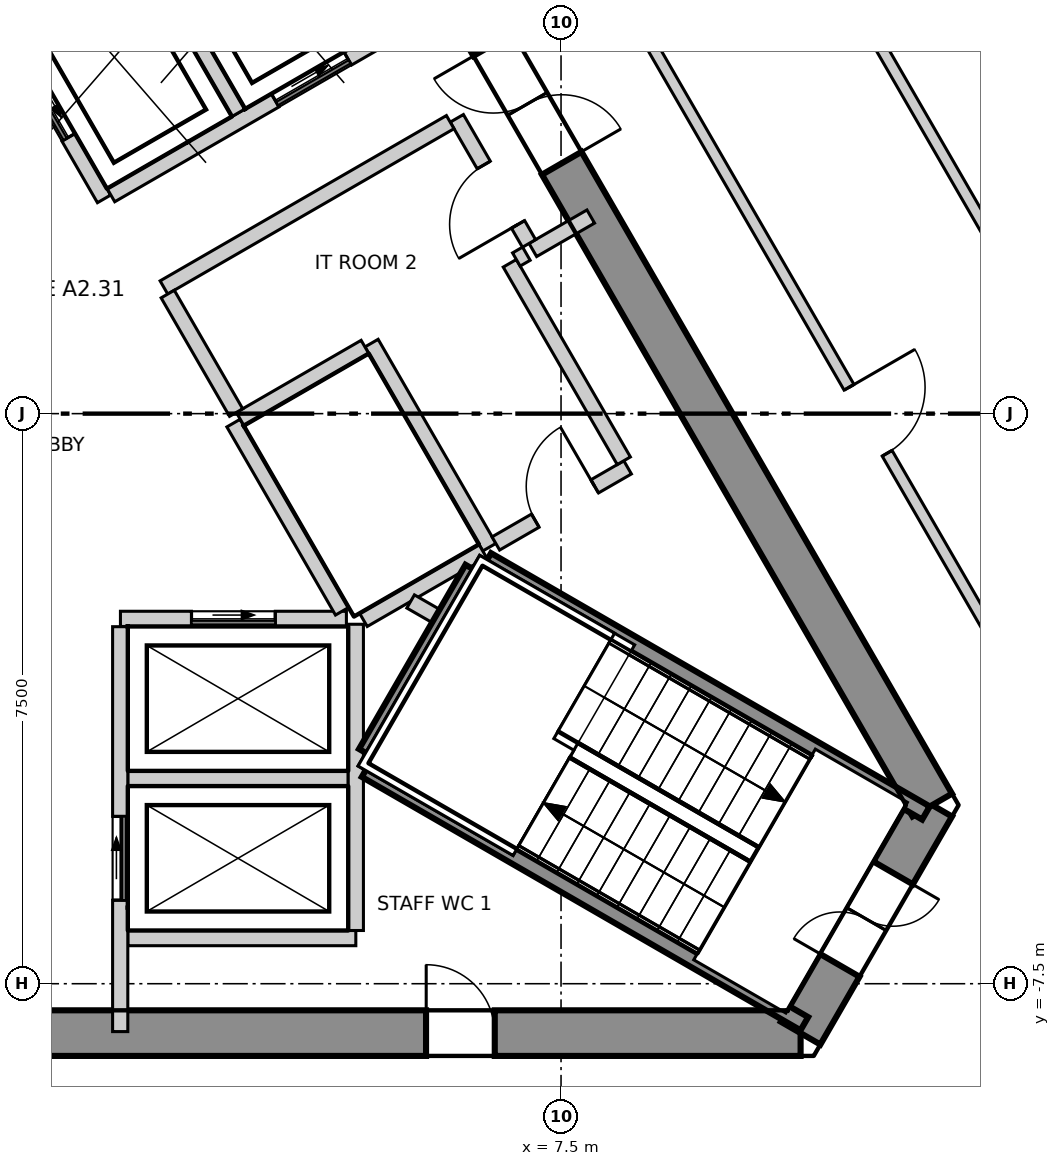
"""IFC4 building model, lengths in metres.
Left out: names, types, materials, properties, quantities, classifications, styles, units other than length and angle.
Written with IfcOpenShell. Run it as: python <this file> out.ifc"""

import sys

from ifc_helpers import new_model, si_unit, direction, frame, frame_2d, origin, place, context, subcontext, project, spatial, polyline, rectangle, outline, extrude, element, fill, save


model = new_model("IFC4")
c1 = context("Model", 3, precision=1e-05, world=origin(), true_north=direction((0.0, 1.0)))
c2 = subcontext(c1, "Body", "Model", "MODEL_VIEW")
j1 = project(units=[si_unit("LENGTHUNIT", "METRE"), si_unit("PLANEANGLEUNIT", "RADIAN")], contexts=[c1])
p1 = place(None, origin())
s1 = spatial("IfcSite", under=j1, at=p1, CompositionType="ELEMENT")
p2 = place(p1, origin())
s2 = spatial("IfcBuilding", under=s1, at=p2, CompositionType="ELEMENT")
p3 = place(p2, frame((0.0, 0.0, 261.8)))
s3 = spatial("IfcBuildingStorey", under=s2, at=p3, CompositionType="ELEMENT", Elevation=261.8)
p4 = place(p3, frame((-10.652, -8.15, -0.3), z_axis=(0.0, 0.0, 1.0), x_axis=(1.0, 0.0, 0.0)))
e1 = element("IfcWall", 1, at=p4, inside=s3, PredefinedType="SHEAR", context=c2, shape_type="SweptSolid", body=[
    extrude(outline(polyline([(-0.173, -0.3), (1.795, -0.3), (3.763, -0.3), (5.731, -0.3), (7.7, -0.3), (9.668, -0.3), (11.636, -0.3), (13.604, -0.3), (15.573, -0.3), (17.541, -0.3), (19.509, -0.3), (21.477, -0.3), (21.131, 0.3), (19.226, 0.3), (17.321, 0.3), (15.415, 0.3), (13.51, 0.3), (11.605, 0.3), (9.699, 0.3), (7.794, 0.3), (5.889, 0.3), (3.984, 0.3), (2.078, 0.3), (0.173, 0.3), (-0.173, -0.3)])), origin(), (0.0, 0.0, 1.0), 6.5),
])
p5 = place(p4, frame((4.026, 0.0, 0.3)))
e2 = element("IfcOpeningElement", 2, at=p5, cuts=e1, PredefinedType="OPENING", context=c2, shape_type="SweptSolid", body=[
    extrude(rectangle(XDim=0.9, YDim=2.1, at=frame_2d((0.45, 1.05))), frame((0.0, 0.31, 0.0), z_axis=(0.0, -1.0, 0.0), x_axis=(1.0, 0.0, 0.0)), (0.0, 0.0, 1.0), 0.62),
])
p6 = place(p4, frame((16.378, 0.0, 0.3)))
e3 = element("IfcOpeningElement", 3, at=p6, cuts=e1, PredefinedType="OPENING", context=c2, shape_type="SweptSolid", body=[
    extrude(rectangle(XDim=0.9, YDim=2.1, at=frame_2d((0.45, 1.05))), frame((0.0, 0.31, 0.0), z_axis=(0.0, -1.0, 0.0), x_axis=(1.0, 0.0, 0.0)), (0.0, 0.0, 1.0), 0.62),
])
p7 = place(p3, frame((10.652, -8.15, -0.3), z_axis=(0.0, 0.0, 1.0), x_axis=(0.49997462182, 0.866040055388, 0.0)))
e4 = element("IfcWall", 4, at=p7, inside=s3, PredefinedType="SHEAR", context=c2, shape_type="SweptSolid", body=[
    extrude(outline(polyline([(-0.173, -0.3), (1.732, -0.301), (3.638, -0.301), (3.291, 0.3), (1.732, 0.3), (0.173, 0.3), (-0.173, -0.3)])), origin(), (0.0, 0.0, 1.0), 6.5),
])
p8 = place(p7, frame((1.032, 0.0, 0.3)))
e5 = element("IfcOpeningElement", 5, at=p8, cuts=e4, PredefinedType="OPENING", context=c2, shape_type="SweptSolid", body=[
    extrude(rectangle(XDim=1.4, YDim=2.1, at=frame_2d((0.7, 1.05))), frame((0.0, 0.31, 0.0), z_axis=(0.0, -1.0, 0.0), x_axis=(1.0, 0.0, 0.0)), (0.0, 0.0, 1.0), 0.621),
])
p9 = place(p3, frame((12.384, -5.15, -0.3), z_axis=(0.0, 0.0, 1.0), x_axis=(-0.500000539815, 0.866025092122, 0.0)))
e6 = element("IfcWall", 6, at=p9, inside=s3, PredefinedType="SHEAR", context=c2, shape_type="SweptSolid", body=[
    extrude(outline(polyline([(-0.173, -0.301), (1.795, -0.301), (3.763, -0.301), (5.731, -0.301), (7.7, -0.301), (9.668, -0.301), (11.636, -0.301), (13.604, -0.3), (15.573, -0.3), (17.541, -0.3), (19.509, -0.3), (21.477, -0.3), (21.131, 0.3), (19.226, 0.3), (17.321, 0.3), (15.415, 0.3), (13.51, 0.3), (11.605, 0.3), (9.699, 0.3), (7.794, 0.3), (5.889, 0.3), (3.984, 0.3), (2.078, 0.3), (0.173, 0.3), (-0.173, -0.301)])), origin(), (0.0, 0.0, 1.0), 6.5),
])
p10 = place(p9, frame((9.752, 0.0, 0.3)))
e7 = element("IfcOpeningElement", 7, at=p10, cuts=e6, PredefinedType="OPENING", context=c2, shape_type="SweptSolid", body=[
    extrude(rectangle(XDim=1.8, YDim=2.1, at=frame_2d((0.9, 1.05))), frame((0.0, 0.31, 0.0), z_axis=(0.0, -1.0, 0.0), x_axis=(1.0, 0.0, 0.0)), (0.0, 0.0, 1.0), 0.621),
])
p11 = place(p9, frame((16.378, 0.0, 0.3)))
e8 = element("IfcOpeningElement", 8, at=p11, cuts=e6, PredefinedType="OPENING", context=c2, shape_type="SweptSolid", body=[
    extrude(rectangle(XDim=0.9, YDim=2.1, at=frame_2d((0.45, 1.05))), frame((0.0, 0.31, 0.0), z_axis=(0.0, -1.0, 0.0), x_axis=(1.0, 0.0, 0.0)), (0.0, 0.0, 1.0), 0.621),
])
p12 = place(p3, frame((2.689, 25.293, 0.0), z_axis=(0.0, 0.0, 1.0), x_axis=(0.500022309378, -0.866012523076, 0.0)))
e9 = element("IfcWall", 9, at=p12, inside=s3, PredefinedType="PARTITIONING", context=c2, shape_type="SweptSolid", body=[
    extrude(rectangle(XDim=41.206, YDim=0.15, at=frame_2d((20.603, 0.0))), origin(), (0.0, 0.0, 1.0), 6.2),
])
p13 = place(p3, frame((2.771, 15.1, 0.0), z_axis=(0.0, 0.0, 1.0), x_axis=(0.500017691629, -0.866015189277, 0.0)))
e10 = element("IfcWall", 10, at=p13, inside=s3, PredefinedType="PARTITIONING", context=c2, shape_type="SweptSolid", body=[
    extrude(rectangle(XDim=23.383, YDim=0.15, at=frame_2d((11.691, 0.0))), origin(), (0.0, 0.0, 1.0), 6.2),
])
p14 = place(p13, frame((17.037, 0.0, 0.0)))
e11 = element("IfcOpeningElement", 11, at=p14, cuts=e10, PredefinedType="OPENING", context=c2, shape_type="SweptSolid", body=[
    extrude(rectangle(XDim=1.0, YDim=2.1, at=frame_2d((0.5, 1.05))), frame((0.0, 0.085, 0.0), z_axis=(0.0, -1.0, 0.0), x_axis=(1.0, 0.0, 0.0)), (0.0, 0.0, 1.0), 0.17),
])
p15 = place(p13, frame((5.346, 0.0, 0.0)))
e12 = element("IfcOpeningElement", 12, at=p15, cuts=e10, PredefinedType="OPENING", context=c2, shape_type="SweptSolid", body=[
    extrude(rectangle(XDim=1.0, YDim=2.1, at=frame_2d((0.5, 1.05))), frame((0.0, 0.085, 0.0), z_axis=(0.0, -1.0, 0.0), x_axis=(1.0, 0.0, 0.0)), (0.0, 0.0, 1.0), 0.17),
])
p16 = place(p3, frame((2.166, 21.349, 0.0), z_axis=(0.0, 0.0, 1.0), x_axis=(0.499984980739, -0.866034074985, 0.0)))
e13 = element("IfcWall", 13, at=p16, inside=s3, PredefinedType="PARTITIONING", context=c2, shape_type="SweptSolid", body=[
    extrude(rectangle(XDim=34.991, YDim=0.15, at=frame_2d((17.495, 0.0))), origin(), (0.0, 0.0, 1.0), 6.2),
])
p17 = place(p3, frame((1.8, -6.9, 0.0), z_axis=(0.0, 0.0, 1.0), x_axis=(1.0, 0.0, 0.0)))
e14 = element("IfcWall", 14, at=p17, inside=s3, PredefinedType="SOLIDWALL", context=c2, shape_type="SweptSolid", body=[
    extrude(rectangle(XDim=3.0, YDim=0.2, at=frame_2d((1.5, 0.0))), origin(), (0.0, 0.0, 1.0), 6.2),
])
p18 = place(p3, frame((1.8, -4.8, 0.0), z_axis=(0.0, 0.0, 1.0), x_axis=(1.0, 0.0, 0.0)))
e15 = element("IfcWall", 15, at=p18, inside=s3, PredefinedType="SOLIDWALL", context=c2, shape_type="SweptSolid", body=[
    extrude(rectangle(XDim=2.9, YDim=0.2, at=frame_2d((1.45, 0.0))), origin(), (0.0, 0.0, 1.0), 6.2),
])
p19 = place(p3, frame((1.703, -2.7, 0.0), z_axis=(0.0, 0.0, 1.0), x_axis=(1.0, 0.0, 0.0)))
e16 = element("IfcWall", 16, at=p19, inside=s3, PredefinedType="SOLIDWALL", context=c2, shape_type="SweptSolid", body=[
    extrude(rectangle(XDim=2.973, YDim=0.2, at=frame_2d((1.487, 0.0))), origin(), (0.0, 0.0, 1.0), 6.2),
])
p20 = place(p19, frame((0.936, 0.0, 0.0)))
e17 = element("IfcOpeningElement", 17, at=p20, cuts=e16, PredefinedType="OPENING", context=c2, shape_type="SweptSolid", body=[
    extrude(rectangle(XDim=1.1, YDim=2.1, at=frame_2d((0.55, 1.05))), frame((0.0, 0.11, 0.0), z_axis=(0.0, -1.0, 0.0), x_axis=(1.0, 0.0, 0.0)), (0.0, 0.0, 1.0), 0.22),
])
p21 = place(p3, frame((0.0, 5.4, 0.0), z_axis=(0.0, 0.0, 1.0), x_axis=(0.500103862429, -0.865965430478, 0.0)))
e18 = element("IfcWall", 18, at=p21, inside=s3, PredefinedType="SOLIDWALL", context=c2, shape_type="SweptSolid", body=[
    extrude(rectangle(XDim=2.973, YDim=0.2, at=frame_2d((1.487, 0.0))), origin(), (0.0, 0.0, 1.0), 6.2),
])
p22 = place(p21, frame((0.937, 0.0, 0.0)))
e19 = element("IfcOpeningElement", 19, at=p22, cuts=e18, PredefinedType="OPENING", context=c2, shape_type="SweptSolid", body=[
    extrude(rectangle(XDim=1.1, YDim=2.1, at=frame_2d((0.55, 1.05))), frame((0.0, 0.11, 0.0), z_axis=(0.0, -1.0, 0.0), x_axis=(1.0, 0.0, 0.0)), (0.0, 0.0, 1.0), 0.22),
])
p23 = place(p3, frame((3.19, -0.125, 0.0), z_axis=(0.0, 0.0, 1.0), x_axis=(0.499988658015, -0.866031951983, 0.0)))
e20 = element("IfcWall", 20, at=p23, inside=s3, PredefinedType="SOLIDWALL", context=c2, shape_type="SweptSolid", body=[
    extrude(rectangle(XDim=2.858, YDim=0.2, at=frame_2d((1.429, 0.0))), origin(), (0.0, 0.0, 1.0), 6.2),
])
p24 = place(p3, frame((1.578, 2.874, 0.0), z_axis=(0.0, 0.0, 1.0), x_axis=(0.866045911672, 0.499964477614, 0.0)))
e21 = element("IfcWall", 21, at=p24, inside=s3, PredefinedType="SOLIDWALL", context=c2, shape_type="SweptSolid", body=[
    extrude(rectangle(XDim=5.327, YDim=0.2, at=frame_2d((2.663, 0.0))), origin(), (0.0, 0.0, 1.0), 6.2),
])
p25 = place(p24, frame((2.496, 0.0, 0.0)))
e22 = element("IfcOpeningElement", 22, at=p25, cuts=e21, PredefinedType="OPENING", context=c2, shape_type="SweptSolid", body=[
    extrude(rectangle(XDim=1.1, YDim=2.1, at=frame_2d((0.55, 1.05))), frame((0.0, 0.11, 0.0), z_axis=(0.0, -1.0, 0.0), x_axis=(1.0, 0.0, 0.0)), (0.0, 0.0, 1.0), 0.22),
])
p26 = place(p3, frame((1.7, -8.13, 0.0), z_axis=(0.0, 0.0, 1.0), x_axis=(0.0, 1.0, 0.0)))
e23 = element("IfcWall", 23, at=p26, inside=s3, PredefinedType="SOLIDWALL", context=c2, shape_type="SweptSolid", body=[
    extrude(rectangle(XDim=5.327, YDim=0.2, at=frame_2d((2.664, 0.0))), origin(), (0.0, 0.0, 1.0), 6.2),
])
p27 = place(p26, frame((1.73, 0.0, 0.0)))
e24 = element("IfcOpeningElement", 24, at=p27, cuts=e23, PredefinedType="OPENING", context=c2, shape_type="SweptSolid", body=[
    extrude(rectangle(XDim=1.1, YDim=2.1, at=frame_2d((0.55, 1.05))), frame((0.0, 0.11, 0.0), z_axis=(0.0, -1.0, 0.0), x_axis=(1.0, 0.0, 0.0)), (0.0, 0.0, 1.0), 0.22),
])
p28 = place(p3, frame((4.8, -6.8, 0.0), z_axis=(0.0, 0.0, 1.0), x_axis=(0.0, 1.0, 0.0)))
e25 = element("IfcWall", 25, at=p28, inside=s3, PredefinedType="SOLIDWALL", context=c2, shape_type="SweptSolid", body=[
    extrude(rectangle(XDim=4.029, YDim=0.2, at=frame_2d((2.015, 0.0))), origin(), (0.0, 0.0, 1.0), 6.2),
])
p29 = place(p3, frame((1.807, 6.47, 0.0), z_axis=(0.0, 0.0, 1.0), x_axis=(0.50012328804, -0.865954211699, 0.0)))
e26 = element("IfcWall", 26, at=p29, inside=s3, PredefinedType="SOLIDWALL", context=c2, shape_type="SweptSolid", body=[
    extrude(rectangle(XDim=2.9, YDim=0.2, at=frame_2d((1.45, 0.0))), origin(), (0.0, 0.0, 1.0), 6.2),
])
p30 = place(p3, frame((5.007, 0.928, 0.0), z_axis=(0.0, 0.0, 1.0), x_axis=(0.499899694197, -0.866083307622, 0.0)))
e27 = element("IfcWall", 27, at=p30, inside=s3, PredefinedType="SOLIDWALL", context=c2, shape_type="SweptSolid", body=[
    extrude(rectangle(XDim=3.1, YDim=0.2, at=frame_2d((1.55, 0.0))), origin(), (0.0, 0.0, 1.0), 6.2),
])
p31 = place(p3, frame((3.278, -0.071, 0.0), z_axis=(0.0, 0.0, 1.0), x_axis=(0.865784509405, 0.500417009377, 0.0)))
e28 = element("IfcWall", 28, at=p31, inside=s3, PredefinedType="SOLIDWALL", context=c2, shape_type="SweptSolid", body=[
    extrude(rectangle(XDim=1.896, YDim=0.2, at=frame_2d((0.948, 0.0))), origin(), (0.0, 0.0, 1.0), 6.2),
])
p32 = place(p3, frame((7.129, 2.153, 0.0), z_axis=(0.0, 0.0, 1.0), x_axis=(0.866083962871, 0.499898558967, 0.0)))
e29 = element("IfcWall", 29, at=p32, inside=s3, PredefinedType="SOLIDWALL", context=c2, shape_type="SweptSolid", body=[
    extrude(rectangle(XDim=0.88, YDim=0.2, at=frame_2d((0.44, 0.0))), origin(), (0.0, 0.0, 1.0), 6.2),
])
p33 = place(p3, frame((6.129, 3.885, 0.0), z_axis=(0.0, 0.0, 1.0), x_axis=(0.499952260202, -0.866052964615, 0.0)))
e30 = element("IfcWall", 30, at=p33, inside=s3, PredefinedType="SOLIDWALL", context=c2, shape_type="SweptSolid", body=[
    extrude(rectangle(XDim=1.901, YDim=0.2, at=frame_2d((0.95, 0.0))), origin(), (0.0, 0.0, 1.0), 6.2),
])
p34 = place(p33, frame((0.71, 0.0, 0.0)))
e31 = element("IfcOpeningElement", 31, at=p34, cuts=e30, PredefinedType="OPENING", context=c2, shape_type="SweptSolid", body=[
    extrude(rectangle(XDim=0.9, YDim=2.1, at=frame_2d((0.45, 1.05))), frame((0.0, 0.11, 0.0), z_axis=(0.0, -1.0, 0.0), x_axis=(1.0, 0.0, 0.0)), (0.0, 0.0, 1.0), 0.22),
])
p35 = place(p3, frame((2.275, 1.66, 0.0), z_axis=(0.0, 0.0, 1.0), x_axis=(0.866013608182, 0.500020430026, 0.0)))
e32 = element("IfcWall", 32, at=p35, inside=s3, PredefinedType="SOLIDWALL", context=c2, shape_type="SweptSolid", body=[
    extrude(rectangle(XDim=4.35, YDim=0.2, at=frame_2d((2.175, 0.0))), origin(), (0.0, 0.0, 1.0), 6.2),
])
p36 = place(p3, frame((2.325, 1.573, 0.0), z_axis=(0.0, 0.0, 1.0), x_axis=(0.500004188491, -0.866022985545, 0.0)))
e33 = element("IfcWall", 33, at=p36, inside=s3, PredefinedType="SOLIDWALL", context=c2, shape_type="SweptSolid", body=[
    extrude(rectangle(XDim=1.8, YDim=0.2, at=frame_2d((0.9, 0.0))), origin(), (0.0, 0.0, 1.0), 6.2),
])
p37 = place(p3, frame((4.9, -2.714, 0.0), z_axis=(0.0, 0.0, 1.0), x_axis=(0.865846928409, 0.500309001083, 0.0)))
e34 = element("IfcWall", 34, at=p37, inside=s3, PredefinedType="SOLIDWALL", context=c2, shape_type="SweptSolid", body=[
    extrude(rectangle(XDim=1.813, YDim=0.2, at=frame_2d((0.907, 0.0))), origin(), (0.0, 0.0, 1.0), 6.2),
])
p38 = place(p3, frame((5.521, -2.471, 0.0), z_axis=(0.0, 0.0, 1.0), x_axis=(0.866630806644, -0.498949942355, 0.0)))
e35 = element("IfcWall", 35, at=p38, inside=s3, PredefinedType="SOLIDWALL", context=c2, shape_type="SweptSolid", body=[
    extrude(rectangle(XDim=0.383, YDim=0.2, at=frame_2d((0.191, 0.0))), origin(), (0.0, 0.0, 1.0), 6.2),
])
p39 = place(p3, frame((6.642, -1.708, 0.0), z_axis=(0.0, 0.0, 1.0), x_axis=(0.866043441391, 0.499968756647, 0.0)))
e36 = element("IfcWall", 36, at=p39, inside=s3, PredefinedType="SOLIDWALL", context=c2, shape_type="SweptSolid", body=[
    extrude(rectangle(XDim=2.002, YDim=0.2, at=frame_2d((1.001, 0.0))), origin(), (0.0, 0.0, 1.0), 6.2),
])
p40 = place(p39, frame((0.601, 0.0, 0.0)))
e37 = element("IfcOpeningElement", 37, at=p40, cuts=e36, PredefinedType="OPENING", context=c2, shape_type="SweptSolid", body=[
    extrude(rectangle(XDim=0.9, YDim=2.1, at=frame_2d((0.45, 1.05))), frame((0.0, 0.11, 0.0), z_axis=(0.0, -1.0, 0.0), x_axis=(1.0, 0.0, 0.0)), (0.0, 0.0, 1.0), 0.22),
])
p41 = place(p3, frame((6.826, 1.978, 0.0), z_axis=(0.0, 0.0, 1.0), x_axis=(0.499990139034, -0.866031096941, 0.0)))
e38 = element("IfcWall", 38, at=p41, inside=s3, PredefinedType="SOLIDWALL", context=c2, shape_type="SweptSolid", body=[
    extrude(rectangle(XDim=3.0, YDim=0.2, at=frame_2d((1.5, 0.0))), origin(), (0.0, 0.0, 1.0), 6.2),
])
p42 = place(p3, frame((6.912, 2.028, 0.0), z_axis=(0.0, 0.0, 1.0), x_axis=(0.866559367082, 0.499074005857, 0.0)))
e39 = element("IfcWall", 39, at=p42, inside=s3, PredefinedType="SOLIDWALL", context=c2, shape_type="SweptSolid", body=[
    extrude(rectangle(XDim=0.152, YDim=0.2, at=frame_2d((0.076, 0.0))), origin(), (0.0, 0.0, 1.0), 6.2),
])
p43 = place(p3, frame((4.929, -4.462, 0.0), z_axis=(0.0, 0.0, 1.0), x_axis=(0.500200581029, 0.865909567298, 0.0)))
e40 = element("IfcWall", 40, at=p43, inside=s3, PredefinedType="SOLIDWALL", context=c2, shape_type="SweptSolid", body=[
    extrude(rectangle(XDim=2.799, YDim=0.2, at=frame_2d((1.399, 0.0))), origin(), (0.0, 0.0, 1.0), 6.2),
])
p44 = place(p3, frame((6.529, -1.922, 0.0), z_axis=(0.0, 0.0, 1.0), x_axis=(0.866068467981, -0.499925403204, 0.0)))
e41 = element("IfcWall", 41, at=p44, inside=s3, PredefinedType="SOLIDWALL", context=c2, shape_type="SweptSolid", body=[
    extrude(rectangle(XDim=6.665, YDim=0.2, at=frame_2d((3.332, 0.0))), origin(), (0.0, 0.0, 1.0), 6.2),
])
p45 = place(p3, frame((4.929, -4.693, 0.0), z_axis=(0.0, 0.0, 1.0), x_axis=(0.866005022404, -0.500035299925, 0.0)))
e42 = element("IfcWall", 42, at=p45, inside=s3, PredefinedType="SOLIDWALL", context=c2, shape_type="SweptSolid", body=[
    extrude(rectangle(XDim=6.665, YDim=0.2, at=frame_2d((3.333, 0.0))), origin(), (0.0, 0.0, 1.0), 6.2),
])
p46 = place(p20, origin())
e43 = element("IfcDoor", 43, at=p46, inside=s3, OperationType="SLIDING_TO_LEFT", PredefinedType="DOOR", context=c2, shape_type="SweptSolid", body=[
    extrude(rectangle(XDim=1.1, YDim=2.1, at=frame_2d((0.55, 1.05))), frame((0.0, 0.025, 0.0), z_axis=(0.0, -1.0, 0.0), x_axis=(1.0, 0.0, 0.0)), (0.0, 0.0, 1.0), 0.05),
])
fill(e17, e43)
p47 = place(p27, origin())
e44 = element("IfcDoor", 44, at=p47, inside=s3, OperationType="SLIDING_TO_LEFT", PredefinedType="DOOR", context=c2, shape_type="SweptSolid", body=[
    extrude(rectangle(XDim=1.1, YDim=2.1, at=frame_2d((0.55, 1.05))), frame((0.0, 0.025, 0.0), z_axis=(0.0, -1.0, 0.0), x_axis=(1.0, 0.0, 0.0)), (0.0, 0.0, 1.0), 0.05),
])
fill(e24, e44)
p48 = place(p22, origin())
e45 = element("IfcDoor", 45, at=p48, inside=s3, OperationType="SLIDING_TO_LEFT", PredefinedType="DOOR", context=c2, shape_type="SweptSolid", body=[
    extrude(rectangle(XDim=1.1, YDim=2.1, at=frame_2d((0.55, 1.05))), frame((0.0, 0.025, 0.0), z_axis=(0.0, -1.0, 0.0), x_axis=(1.0, 0.0, 0.0)), (0.0, 0.0, 1.0), 0.05),
])
fill(e19, e45)
p49 = place(p25, origin())
e46 = element("IfcDoor", 46, at=p49, inside=s3, OperationType="SLIDING_TO_LEFT", PredefinedType="DOOR", context=c2, shape_type="SweptSolid", body=[
    extrude(rectangle(XDim=1.1, YDim=2.1, at=frame_2d((0.55, 1.05))), frame((0.0, 0.025, 0.0), z_axis=(0.0, -1.0, 0.0), x_axis=(1.0, 0.0, 0.0)), (0.0, 0.0, 1.0), 0.05),
])
fill(e22, e46)
p50 = place(p14, origin())
e47 = element("IfcDoor", 47, at=p50, inside=s3, OperationType="SINGLE_SWING_RIGHT", PredefinedType="DOOR", context=c2, shape_type="SweptSolid", body=[
    extrude(rectangle(XDim=1.0, YDim=2.1, at=frame_2d((0.5, 1.05))), frame((0.0, 0.025, 0.0), z_axis=(0.0, -1.0, 0.0), x_axis=(1.0, 0.0, 0.0)), (0.0, 0.0, 1.0), 0.05),
])
fill(e11, e47)
p51 = place(p10, origin())
e48 = element("IfcDoor", 48, at=p51, inside=s3, OperationType="DOUBLE_DOOR_SINGLE_SWING", PredefinedType="DOOR", context=c2, shape_type="SweptSolid", body=[
    extrude(rectangle(XDim=1.8, YDim=2.1, at=frame_2d((0.9, 1.05))), frame((0.0, 0.025, 0.0), z_axis=(0.0, -1.0, 0.0), x_axis=(1.0, 0.0, 0.0)), (0.0, 0.0, 1.0), 0.05),
])
fill(e7, e48)
p52 = place(p8, origin())
e49 = element("IfcDoor", 49, at=p52, inside=s3, OperationType="DOUBLE_DOOR_SINGLE_SWING", PredefinedType="DOOR", context=c2, shape_type="SweptSolid", body=[
    extrude(rectangle(XDim=1.4, YDim=2.1, at=frame_2d((0.7, 1.05))), frame((0.0, 0.025, 0.0), z_axis=(0.0, -1.0, 0.0), x_axis=(1.0, 0.0, 0.0)), (0.0, 0.0, 1.0), 0.05),
])
fill(e5, e49)
p53 = place(p6, origin())
e50 = element("IfcDoor", 50, at=p53, inside=s3, OperationType="SINGLE_SWING_RIGHT", PredefinedType="DOOR", context=c2, shape_type="SweptSolid", body=[
    extrude(rectangle(XDim=0.9, YDim=2.1, at=frame_2d((0.45, 1.05))), frame((0.0, 0.025, 0.0), z_axis=(0.0, -1.0, 0.0), x_axis=(1.0, 0.0, 0.0)), (0.0, 0.0, 1.0), 0.05),
])
fill(e3, e50)
p54 = place(p40, origin())
e51 = element("IfcDoor", 51, at=p54, inside=s3, OperationType="SINGLE_SWING_LEFT", PredefinedType="DOOR", context=c2, shape_type="SweptSolid", body=[
    extrude(rectangle(XDim=0.9, YDim=2.1, at=frame_2d((0.45, 1.05))), frame((0.0, 0.025, 0.0), z_axis=(0.0, -1.0, 0.0), x_axis=(1.0, 0.0, 0.0)), (0.0, 0.0, 1.0), 0.05),
])
fill(e37, e51)
p55 = place(p34, origin())
e52 = element("IfcDoor", 52, at=p55, inside=s3, OperationType="SINGLE_SWING_RIGHT", PredefinedType="DOOR", context=c2, shape_type="SweptSolid", body=[
    extrude(rectangle(XDim=0.9, YDim=2.1, at=frame_2d((0.45, 1.05))), frame((0.0, 0.025, 0.0), z_axis=(0.0, -1.0, 0.0), x_axis=(1.0, 0.0, 0.0)), (0.0, 0.0, 1.0), 0.05),
])
fill(e31, e52)
save(model, sys.argv[1])
